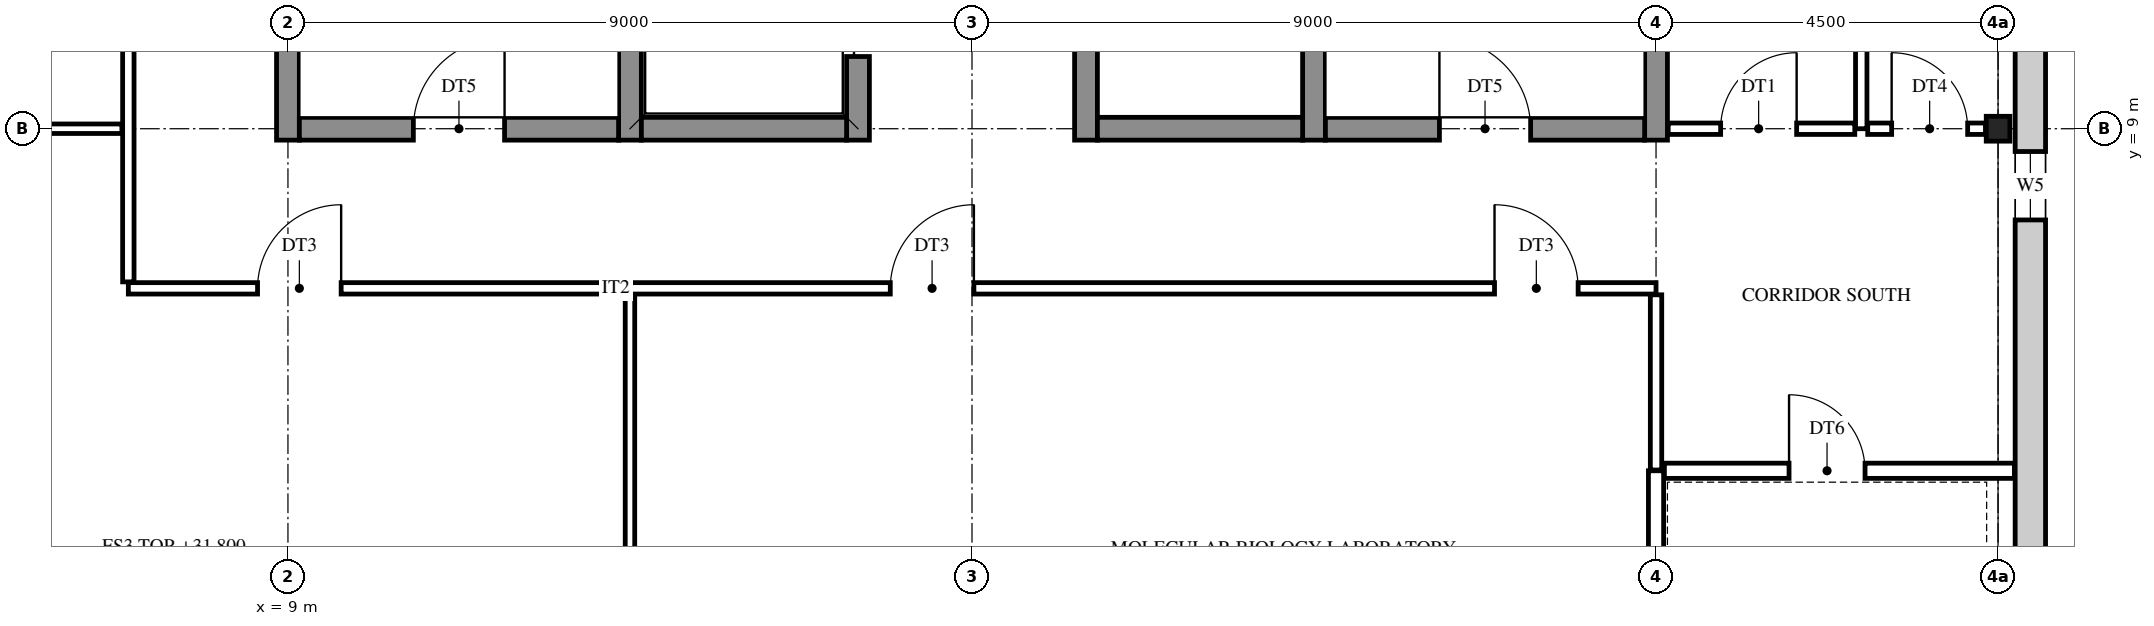
"""IFC4 building model, lengths in metres.
Left out: names, types, materials, properties, quantities, classifications, styles, units other than length and angle.
Written with IfcOpenShell. Run it as: python <this file> out.ifc"""

import sys

from ifc_helpers import new_model, si_unit, direction, frame, frame_2d, origin, origin_2d, place, context, subcontext, project, spatial, rectangle, i_section, extrude, element, fill, save


model = new_model("IFC4")
c1 = context("Model", 3, precision=1e-05, world=origin(), true_north=direction((0.0, 1.0)))
c2 = subcontext(c1, "Body", "Model", "MODEL_VIEW")
j1 = project(units=[si_unit("LENGTHUNIT", "METRE"), si_unit("PLANEANGLEUNIT", "RADIAN")], contexts=[c1])
p1 = place(None, origin())
s1 = spatial("IfcSite", under=j1, at=p1, CompositionType="ELEMENT")
p2 = place(p1, origin())
s2 = spatial("IfcBuilding", under=s1, at=p2, CompositionType="ELEMENT")
p3 = place(p2, frame((0.0, 0.0, 31.8)))
s3 = spatial("IfcBuildingStorey", under=s2, at=p3, CompositionType="ELEMENT", Elevation=31.8)
p4 = place(p3, frame((31.5, 9.0, 0.0), z_axis=(0.0, 0.0, 1.0), x_axis=(1.0, 0.0, 0.0)))
e1 = element("IfcColumn", 1, at=p4, inside=s3, PredefinedType="COLUMN", context=c2, shape_type="SweptSolid", body=[
    extrude(i_section(OverallWidth=0.311, OverallDepth=0.327, WebThickness=0.016, FlangeThickness=0.025, FilletRadius=0.017, at=origin_2d()), origin(), (0.0, 0.0, 1.0), 4.2),
])
for number, where, z_axis, x_axis in (
    (2, (9.0, 8.85, 0.0), (0.0, 0.0, 1.0), (0.0, 1.0, 0.0)),
    (3, (13.5, 8.85, 0.0), (0.0, 0.0, 1.0), (0.0, 1.0, 0.0)),
):
    element("IfcWall", number, at=place(p3, frame(where, z_axis=z_axis, x_axis=x_axis)), inside=s3, PredefinedType="SHEAR", context=c2, shape_type="SweptSolid", body=[
        extrude(rectangle(XDim=9.3, YDim=0.3, at=frame_2d((4.65, 0.0))), origin(), (0.0, 0.0, 1.0), 4.2),
    ])
p5 = place(p3, frame((16.5, 8.85, 0.0), z_axis=(0.0, 0.0, 1.0), x_axis=(0.0, 1.0, 0.0)))
e4 = element("IfcWall", 4, at=p5, inside=s3, PredefinedType="SHEAR", context=c2, shape_type="SweptSolid", body=[
    extrude(rectangle(XDim=9.3, YDim=0.3, at=frame_2d((4.65, 0.0))), origin(), (0.0, 0.0, 1.0), 4.2),
])
p6 = place(p5, frame((1.1, 0.0, 0.0)))
e5 = element("IfcOpeningElement", 5, at=p6, cuts=e4, PredefinedType="OPENING", context=c2, shape_type="SweptSolid", body=[
    extrude(rectangle(XDim=1.1, YDim=2.1, at=frame_2d((0.55, 1.05))), frame((0.0, 0.16, 0.0), z_axis=(0.0, -1.0, 0.0), x_axis=(1.0, 0.0, 0.0)), (0.0, 0.0, 1.0), 0.32),
])
p7 = place(p5, frame((4.1, 0.0, 0.0)))
e6 = element("IfcOpeningElement", 6, at=p7, cuts=e4, PredefinedType="OPENING", context=c2, shape_type="SweptSolid", body=[
    extrude(rectangle(XDim=1.1, YDim=2.1, at=frame_2d((0.55, 1.05))), frame((0.0, 0.16, 0.0), z_axis=(0.0, -1.0, 0.0), x_axis=(1.0, 0.0, 0.0)), (0.0, 0.0, 1.0), 0.32),
])
p8 = place(p3, frame((19.5, 8.85, 0.0), z_axis=(0.0, 0.0, 1.0), x_axis=(0.0, 1.0, 0.0)))
e7 = element("IfcWall", 7, at=p8, inside=s3, PredefinedType="SHEAR", context=c2, shape_type="SweptSolid", body=[
    extrude(rectangle(XDim=9.3, YDim=0.3, at=frame_2d((4.65, 0.0))), origin(), (0.0, 0.0, 1.0), 4.2),
])
p9 = place(p8, frame((3.95, 0.0, 0.0)))
e8 = element("IfcOpeningElement", 8, at=p9, cuts=e7, PredefinedType="OPENING", context=c2, shape_type="SweptSolid", body=[
    extrude(rectangle(XDim=1.4, YDim=2.1, at=frame_2d((0.7, 1.05))), frame((0.0, 0.16, 0.0), z_axis=(0.0, -1.0, 0.0), x_axis=(1.0, 0.0, 0.0)), (0.0, 0.0, 1.0), 0.32),
])
p10 = place(p8, frame((7.1, 0.0, 0.0)))
e9 = element("IfcOpeningElement", 9, at=p10, cuts=e7, PredefinedType="OPENING", context=c2, shape_type="SweptSolid", body=[
    extrude(rectangle(XDim=1.1, YDim=2.1, at=frame_2d((0.55, 1.05))), frame((0.0, 0.16, 0.0), z_axis=(0.0, -1.0, 0.0), x_axis=(1.0, 0.0, 0.0)), (0.0, 0.0, 1.0), 0.32),
])
for number, where, z_axis, x_axis in (
    (10, (22.5, 8.85, 0.0), (0.0, 0.0, 1.0), (0.0, 1.0, 0.0)),
    (11, (27.0, 8.85, 0.0), (0.0, 0.0, 1.0), (0.0, 1.0, 0.0)),
):
    element("IfcWall", number, at=place(p3, frame(where, z_axis=z_axis, x_axis=x_axis)), inside=s3, PredefinedType="SHEAR", context=c2, shape_type="SweptSolid", body=[
        extrude(rectangle(XDim=9.3, YDim=0.3, at=frame_2d((4.65, 0.0))), origin(), (0.0, 0.0, 1.0), 4.2),
    ])
p11 = place(p3, frame((9.15, 9.0, 0.0), z_axis=(0.0, 0.0, 1.0), x_axis=(1.0, 0.0, 0.0)))
e12 = element("IfcWall", 12, at=p11, inside=s3, PredefinedType="SHEAR", context=c2, shape_type="SweptSolid", body=[
    extrude(rectangle(XDim=4.2, YDim=0.3, at=frame_2d((2.1, 0.0))), origin(), (0.0, 0.0, 1.0), 4.2),
])
p12 = place(p11, frame((1.5, 0.0, 0.0)))
e13 = element("IfcOpeningElement", 13, at=p12, cuts=e12, PredefinedType="OPENING", context=c2, shape_type="SweptSolid", body=[
    extrude(rectangle(XDim=1.2, YDim=2.1, at=frame_2d((0.6, 1.05))), frame((0.0, 0.16, 0.0), z_axis=(0.0, -1.0, 0.0), x_axis=(1.0, 0.0, 0.0)), (0.0, 0.0, 1.0), 0.32),
])
for number, where, z_axis, x_axis in (
    (14, (13.65, 9.0, 0.0), (0.0, 0.0, 1.0), (1.0, 0.0, 0.0)),
    (15, (19.65, 9.0, 0.0), (0.0, 0.0, 1.0), (1.0, 0.0, 0.0)),
):
    element("IfcWall", number, at=place(p3, frame(where, z_axis=z_axis, x_axis=x_axis)), inside=s3, PredefinedType="SHEAR", context=c2, shape_type="SweptSolid", body=[
        extrude(rectangle(XDim=2.7, YDim=0.3, at=frame_2d((1.35, 0.0))), origin(), (0.0, 0.0, 1.0), 4.2),
    ])
p13 = place(p3, frame((22.65, 9.0, 0.0), z_axis=(0.0, 0.0, 1.0), x_axis=(1.0, 0.0, 0.0)))
e16 = element("IfcWall", 16, at=p13, inside=s3, PredefinedType="SHEAR", context=c2, shape_type="SweptSolid", body=[
    extrude(rectangle(XDim=4.2, YDim=0.3, at=frame_2d((2.1, 0.0))), origin(), (0.0, 0.0, 1.0), 4.2),
])
p14 = place(p13, frame((1.5, 0.0, 0.0)))
e17 = element("IfcOpeningElement", 17, at=p14, cuts=e16, PredefinedType="OPENING", context=c2, shape_type="SweptSolid", body=[
    extrude(rectangle(XDim=1.2, YDim=2.1, at=frame_2d((0.6, 1.05))), frame((0.0, 0.16, 0.0), z_axis=(0.0, -1.0, 0.0), x_axis=(1.0, 0.0, 0.0)), (0.0, 0.0, 1.0), 0.32),
])
p15 = place(p3, frame((31.925, 27.225, 0.0), z_axis=(0.0, 0.0, 1.0), x_axis=(0.0, -1.0, 0.0)))
e18 = element("IfcWall", 18, at=p15, inside=s3, PredefinedType="STANDARD", context=c2, shape_type="SweptSolid", body=[
    extrude(rectangle(XDim=27.45, YDim=0.4, at=frame_2d((13.725, 0.0))), origin(), (0.0, 0.0, 1.0), 4.2),
])
p16 = place(p15, frame((26.025, 0.0, 0.9)))
e19 = element("IfcOpeningElement", 19, at=p16, cuts=e18, PredefinedType="OPENING", context=c2, shape_type="SweptSolid", body=[
    extrude(rectangle(XDim=0.9, YDim=2.0, at=frame_2d((0.45, 1.0))), frame((0.0, 0.21, 0.0), z_axis=(0.0, -1.0, 0.0), x_axis=(1.0, 0.0, 0.0)), (0.0, 0.0, 1.0), 0.42),
])
p17 = place(p15, frame((18.525, 0.0, 0.9)))
e20 = element("IfcOpeningElement", 20, at=p17, cuts=e18, PredefinedType="OPENING", context=c2, shape_type="SweptSolid", body=[
    extrude(rectangle(XDim=0.9, YDim=2.0, at=frame_2d((0.45, 1.0))), frame((0.0, 0.21, 0.0), z_axis=(0.0, -1.0, 0.0), x_axis=(1.0, 0.0, 0.0)), (0.0, 0.0, 1.0), 0.42),
])
p18 = place(p15, frame((15.675, 0.0, 1.6)))
e21 = element("IfcOpeningElement", 21, at=p18, cuts=e18, PredefinedType="OPENING", context=c2, shape_type="SweptSolid", body=[
    extrude(rectangle(XDim=0.6, YDim=0.9, at=frame_2d((0.3, 0.45))), frame((0.0, 0.21, 0.0), z_axis=(0.0, -1.0, 0.0), x_axis=(1.0, 0.0, 0.0)), (0.0, 0.0, 1.0), 0.42),
])
p19 = place(p15, frame((11.175, 0.0, 1.6)))
e22 = element("IfcOpeningElement", 22, at=p19, cuts=e18, PredefinedType="OPENING", context=c2, shape_type="SweptSolid", body=[
    extrude(rectangle(XDim=0.6, YDim=0.9, at=frame_2d((0.3, 0.45))), frame((0.0, 0.21, 0.0), z_axis=(0.0, -1.0, 0.0), x_axis=(1.0, 0.0, 0.0)), (0.0, 0.0, 1.0), 0.42),
])
p20 = place(p15, frame((8.025, 0.0, 0.9)))
e23 = element("IfcOpeningElement", 23, at=p20, cuts=e18, PredefinedType="OPENING", context=c2, shape_type="SweptSolid", body=[
    extrude(rectangle(XDim=0.9, YDim=2.0, at=frame_2d((0.45, 1.0))), frame((0.0, 0.21, 0.0), z_axis=(0.0, -1.0, 0.0), x_axis=(1.0, 0.0, 0.0)), (0.0, 0.0, 1.0), 0.42),
])
p21 = place(p15, frame((0.525, 0.0, 0.9)))
e24 = element("IfcOpeningElement", 24, at=p21, cuts=e18, PredefinedType="OPENING", context=c2, shape_type="SweptSolid", body=[
    extrude(rectangle(XDim=0.9, YDim=2.0, at=frame_2d((0.45, 1.0))), frame((0.0, 0.21, 0.0), z_axis=(0.0, -1.0, 0.0), x_axis=(1.0, 0.0, 0.0)), (0.0, 0.0, 1.0), 0.42),
])
p22 = place(p3, frame((6.9, 6.985, 0.0), z_axis=(0.0, 0.0, 1.0), x_axis=(0.0, 1.0, 0.0)))
e25 = element("IfcWall", 25, at=p22, inside=s3, PredefinedType="PARTITIONING", context=c2, shape_type="SweptSolid", body=[
    extrude(rectangle(XDim=13.03, YDim=0.15, at=frame_2d((6.515, 0.0))), origin(), (0.0, 0.0, 1.0), 3.537),
])
p23 = place(p22, frame((11.565, 0.0, 0.0)))
e26 = element("IfcOpeningElement", 26, at=p23, cuts=e25, PredefinedType="OPENING", context=c2, shape_type="SweptSolid", body=[
    extrude(rectangle(XDim=1.0, YDim=2.1, at=frame_2d((0.5, 1.05))), frame((0.0, 0.085, 0.0), z_axis=(0.0, -1.0, 0.0), x_axis=(1.0, 0.0, 0.0)), (0.0, 0.0, 1.0), 0.17),
])
p24 = place(p22, frame((5.965, 0.0, 0.0)))
e27 = element("IfcOpeningElement", 27, at=p24, cuts=e25, PredefinedType="OPENING", context=c2, shape_type="SweptSolid", body=[
    extrude(rectangle(XDim=1.1, YDim=2.1, at=frame_2d((0.55, 1.05))), frame((0.0, 0.085, 0.0), z_axis=(0.0, -1.0, 0.0), x_axis=(1.0, 0.0, 0.0)), (0.0, 0.0, 1.0), 0.17),
])
p25 = place(p3, frame((13.5, -0.226, 0.0), z_axis=(0.0, 0.0, 1.0), x_axis=(0.0, 1.0, 0.0)))
e28 = element("IfcWall", 28, at=p25, inside=s3, PredefinedType="PARTITIONING", context=c2, shape_type="SweptSolid", body=[
    extrude(rectangle(XDim=7.041, YDim=0.125, at=frame_2d((3.521, 0.0))), origin(), (0.0, 0.0, 1.0), 3.537),
])
p26 = place(p3, frame((27.0, 0.174, 0.0), z_axis=(0.0, 0.0, 1.0), x_axis=(0.0, 1.0, 0.0)))
e29 = element("IfcWall", 29, at=p26, inside=s3, PredefinedType="PARTITIONING", context=c2, shape_type="SweptSolid", body=[
    extrude(rectangle(XDim=4.326, YDim=0.2, at=frame_2d((2.163, 0.0))), origin(), (0.0, 0.0, 1.0), 3.537),
])
p27 = place(p3, frame((27.0, 4.51, 0.0), z_axis=(0.0, 0.0, 1.0), x_axis=(0.0, 1.0, 0.0)))
e30 = element("IfcWall", 30, at=p27, inside=s3, PredefinedType="PARTITIONING", context=c2, shape_type="SweptSolid", body=[
    extrude(rectangle(XDim=2.305, YDim=0.15, at=frame_2d((1.152, 0.0))), origin(), (0.0, 0.0, 1.0), 3.537),
])
p28 = place(p3, frame((29.7, 9.0, 0.0), z_axis=(0.0, 0.0, 1.0), x_axis=(0.0, 1.0, 0.0)))
e31 = element("IfcWall", 31, at=p28, inside=s3, PredefinedType="PARTITIONING", context=c2, shape_type="SweptSolid", body=[
    extrude(rectangle(XDim=6.3, YDim=0.15, at=frame_2d((3.15, 0.0))), origin(), (0.0, 0.0, 1.0), 3.537),
])
p29 = place(p28, frame((4.0, 0.0, 0.0)))
e32 = element("IfcOpeningElement", 32, at=p29, cuts=e31, PredefinedType="OPENING", context=c2, shape_type="SweptSolid", body=[
    extrude(rectangle(XDim=1.0, YDim=2.1, at=frame_2d((0.5, 1.05))), frame((0.0, 0.085, 0.0), z_axis=(0.0, -1.0, 0.0), x_axis=(1.0, 0.0, 0.0)), (0.0, 0.0, 1.0), 0.17),
])
p30 = place(p3, frame((27.11, 4.5, 0.0), z_axis=(0.0, 0.0, 1.0), x_axis=(1.0, 0.0, 0.0)))
e33 = element("IfcWall", 33, at=p30, inside=s3, PredefinedType="PARTITIONING", context=c2, shape_type="SweptSolid", body=[
    extrude(rectangle(XDim=4.605, YDim=0.2, at=frame_2d((2.302, 0.0))), origin(), (0.0, 0.0, 1.0), 3.537),
])
p31 = place(p30, frame((1.64, 0.0, 0.0)))
e34 = element("IfcOpeningElement", 34, at=p31, cuts=e33, PredefinedType="OPENING", context=c2, shape_type="SweptSolid", body=[
    extrude(rectangle(XDim=1.0, YDim=2.1, at=frame_2d((0.5, 1.05))), frame((0.0, 0.11, 0.0), z_axis=(0.0, -1.0, 0.0), x_axis=(1.0, 0.0, 0.0)), (0.0, 0.0, 1.0), 0.22),
])
p32 = place(p3, frame((6.9, 6.9, 0.0), z_axis=(0.0, 0.0, 1.0), x_axis=(1.0, 0.0, 0.0)))
e35 = element("IfcWall", 35, at=p32, inside=s3, PredefinedType="PARTITIONING", context=c2, shape_type="SweptSolid", body=[
    extrude(rectangle(XDim=20.1, YDim=0.15, at=frame_2d((10.05, 0.0))), origin(), (0.0, 0.0, 1.0), 3.537),
])
p33 = place(p32, frame((1.7, 0.0, 0.0)))
e36 = element("IfcOpeningElement", 36, at=p33, cuts=e35, PredefinedType="OPENING", context=c2, shape_type="SweptSolid", body=[
    extrude(rectangle(XDim=1.1, YDim=2.1, at=frame_2d((0.55, 1.05))), frame((0.0, 0.085, 0.0), z_axis=(0.0, -1.0, 0.0), x_axis=(1.0, 0.0, 0.0)), (0.0, 0.0, 1.0), 0.17),
])
p34 = place(p32, frame((17.975, 0.0, 0.0)))
e37 = element("IfcOpeningElement", 37, at=p34, cuts=e35, PredefinedType="OPENING", context=c2, shape_type="SweptSolid", body=[
    extrude(rectangle(XDim=1.1, YDim=2.1, at=frame_2d((0.55, 1.05))), frame((0.0, 0.085, 0.0), z_axis=(0.0, -1.0, 0.0), x_axis=(1.0, 0.0, 0.0)), (0.0, 0.0, 1.0), 0.17),
])
p35 = place(p32, frame((10.025, 0.0, 0.0)))
e38 = element("IfcOpeningElement", 38, at=p35, cuts=e35, PredefinedType="OPENING", context=c2, shape_type="SweptSolid", body=[
    extrude(rectangle(XDim=1.1, YDim=2.1, at=frame_2d((0.55, 1.05))), frame((0.0, 0.085, 0.0), z_axis=(0.0, -1.0, 0.0), x_axis=(1.0, 0.0, 0.0)), (0.0, 0.0, 1.0), 0.17),
])
p36 = place(p3, frame((0.166, 9.0, 0.0), z_axis=(0.0, 0.0, 1.0), x_axis=(1.0, 0.0, 0.0)))
e39 = element("IfcWall", 39, at=p36, inside=s3, PredefinedType="PARTITIONING", context=c2, shape_type="SweptSolid", body=[
    extrude(rectangle(XDim=6.649, YDim=0.125, at=frame_2d((3.325, 0.0))), origin(), (0.0, 0.0, 1.0), 3.537),
])
p37 = place(p3, frame((27.16, 9.0, 0.0), z_axis=(0.0, 0.0, 1.0), x_axis=(1.0, 0.0, 0.0)))
e40 = element("IfcWall", 40, at=p37, inside=s3, PredefinedType="PARTITIONING", context=c2, shape_type="SweptSolid", body=[
    extrude(rectangle(XDim=2.455, YDim=0.15, at=frame_2d((1.228, 0.0))), origin(), (0.0, 0.0, 1.0), 3.537),
])
p38 = place(p37, frame((0.69, 0.0, 0.0)))
e41 = element("IfcOpeningElement", 41, at=p38, cuts=e40, PredefinedType="OPENING", context=c2, shape_type="SweptSolid", body=[
    extrude(rectangle(XDim=1.0, YDim=2.1, at=frame_2d((0.5, 1.05))), frame((0.0, 0.085, 0.0), z_axis=(0.0, -1.0, 0.0), x_axis=(1.0, 0.0, 0.0)), (0.0, 0.0, 1.0), 0.17),
])
p39 = place(p3, frame((29.785, 9.0, 0.0), z_axis=(0.0, 0.0, 1.0), x_axis=(1.0, 0.0, 0.0)))
e42 = element("IfcWall", 42, at=p39, inside=s3, PredefinedType="PARTITIONING", context=c2, shape_type="SweptSolid", body=[
    extrude(rectangle(XDim=1.55, YDim=0.15, at=frame_2d((0.775, 0.0))), origin(), (0.0, 0.0, 1.0), 3.537),
])
p40 = place(p39, frame((0.315, 0.0, 0.0)))
e43 = element("IfcOpeningElement", 43, at=p40, cuts=e42, PredefinedType="OPENING", context=c2, shape_type="SweptSolid", body=[
    extrude(rectangle(XDim=1.0, YDim=2.1, at=frame_2d((0.5, 1.05))), frame((0.0, 0.085, 0.0), z_axis=(0.0, -1.0, 0.0), x_axis=(1.0, 0.0, 0.0)), (0.0, 0.0, 1.0), 0.17),
])
p41 = place(p17, origin())
e44 = element("IfcWindow", 44, at=p41, inside=s3, PartitioningType="SINGLE_PANEL", PredefinedType="WINDOW", context=c2, shape_type="SweptSolid", body=[
    extrude(rectangle(XDim=0.9, YDim=2.0, at=frame_2d((0.45, 1.0))), frame((0.0, 0.03, 0.0), z_axis=(0.0, -1.0, 0.0), x_axis=(1.0, 0.0, 0.0)), (0.0, 0.0, 1.0), 0.06),
])
fill(e20, e44)
p42 = place(p12, origin())
e45 = element("IfcDoor", 45, at=p42, inside=s3, OperationType="SINGLE_SWING_RIGHT", PredefinedType="DOOR", context=c2, shape_type="SweptSolid", body=[
    extrude(rectangle(XDim=1.2, YDim=2.1, at=frame_2d((0.6, 1.05))), frame((0.0, 0.025, 0.0), z_axis=(0.0, -1.0, 0.0), x_axis=(1.0, 0.0, 0.0)), (0.0, 0.0, 1.0), 0.05),
])
fill(e13, e45)
p43 = place(p14, origin())
e46 = element("IfcDoor", 46, at=p43, inside=s3, OperationType="SINGLE_SWING_LEFT", PredefinedType="DOOR", context=c2, shape_type="SweptSolid", body=[
    extrude(rectangle(XDim=1.2, YDim=2.1, at=frame_2d((0.6, 1.05))), frame((0.0, 0.025, 0.0), z_axis=(0.0, -1.0, 0.0), x_axis=(1.0, 0.0, 0.0)), (0.0, 0.0, 1.0), 0.05),
])
fill(e17, e46)
p44 = place(p38, origin())
e47 = element("IfcDoor", 47, at=p44, inside=s3, OperationType="SINGLE_SWING_RIGHT", PredefinedType="DOOR", context=c2, shape_type="SweptSolid", body=[
    extrude(rectangle(XDim=1.0, YDim=2.1, at=frame_2d((0.5, 1.05))), frame((0.0, 0.025, 0.0), z_axis=(0.0, -1.0, 0.0), x_axis=(1.0, 0.0, 0.0)), (0.0, 0.0, 1.0), 0.05),
])
fill(e41, e47)
p45 = place(p40, origin())
e48 = element("IfcDoor", 48, at=p45, inside=s3, OperationType="SINGLE_SWING_LEFT", PredefinedType="DOOR", context=c2, shape_type="SweptSolid", body=[
    extrude(rectangle(XDim=1.0, YDim=2.1, at=frame_2d((0.5, 1.05))), frame((0.0, 0.025, 0.0), z_axis=(0.0, -1.0, 0.0), x_axis=(1.0, 0.0, 0.0)), (0.0, 0.0, 1.0), 0.05),
])
fill(e43, e48)
p46 = place(p31, frame((1.0, 0.0, 0.0), z_axis=(0.0, 0.0, 1.0), x_axis=(-1.0, 0.0, 0.0)))
e49 = element("IfcDoor", 49, at=p46, inside=s3, OperationType="SINGLE_SWING_LEFT", PredefinedType="DOOR", context=c2, shape_type="SweptSolid", body=[
    extrude(rectangle(XDim=1.0, YDim=2.1, at=frame_2d((0.5, 1.05))), frame((0.0, 0.025, 0.0), z_axis=(0.0, -1.0, 0.0), x_axis=(1.0, 0.0, 0.0)), (0.0, 0.0, 1.0), 0.05),
])
fill(e34, e49)
p47 = place(p33, frame((1.1, 0.0, 0.0), z_axis=(0.0, 0.0, 1.0), x_axis=(-1.0, 0.0, 0.0)))
e50 = element("IfcDoor", 50, at=p47, inside=s3, OperationType="SINGLE_SWING_RIGHT", PredefinedType="DOOR", context=c2, shape_type="SweptSolid", body=[
    extrude(rectangle(XDim=1.1, YDim=2.1, at=frame_2d((0.55, 1.05))), frame((0.0, 0.025, 0.0), z_axis=(0.0, -1.0, 0.0), x_axis=(1.0, 0.0, 0.0)), (0.0, 0.0, 1.0), 0.05),
])
fill(e36, e50)
p48 = place(p34, frame((1.1, 0.0, 0.0), z_axis=(0.0, 0.0, 1.0), x_axis=(-1.0, 0.0, 0.0)))
e51 = element("IfcDoor", 51, at=p48, inside=s3, OperationType="SINGLE_SWING_LEFT", PredefinedType="DOOR", context=c2, shape_type="SweptSolid", body=[
    extrude(rectangle(XDim=1.1, YDim=2.1, at=frame_2d((0.55, 1.05))), frame((0.0, 0.025, 0.0), z_axis=(0.0, -1.0, 0.0), x_axis=(1.0, 0.0, 0.0)), (0.0, 0.0, 1.0), 0.05),
])
fill(e37, e51)
p49 = place(p35, frame((1.1, 0.0, 0.0), z_axis=(0.0, 0.0, 1.0), x_axis=(-1.0, 0.0, 0.0)))
e52 = element("IfcDoor", 52, at=p49, inside=s3, OperationType="SINGLE_SWING_RIGHT", PredefinedType="DOOR", context=c2, shape_type="SweptSolid", body=[
    extrude(rectangle(XDim=1.1, YDim=2.1, at=frame_2d((0.55, 1.05))), frame((0.0, 0.025, 0.0), z_axis=(0.0, -1.0, 0.0), x_axis=(1.0, 0.0, 0.0)), (0.0, 0.0, 1.0), 0.05),
])
fill(e38, e52)
p50 = place(p6, origin())
e53 = element("IfcDoor", 53, at=p50, inside=s3, OperationType="DOUBLE_DOOR_SLIDING", PredefinedType="DOOR", context=c2, shape_type="SweptSolid", body=[
    extrude(rectangle(XDim=1.1, YDim=2.1, at=frame_2d((0.55, 1.05))), frame((0.0, 0.025, 0.0), z_axis=(0.0, -1.0, 0.0), x_axis=(1.0, 0.0, 0.0)), (0.0, 0.0, 1.0), 0.05),
])
fill(e5, e53)
save(model, sys.argv[1])
